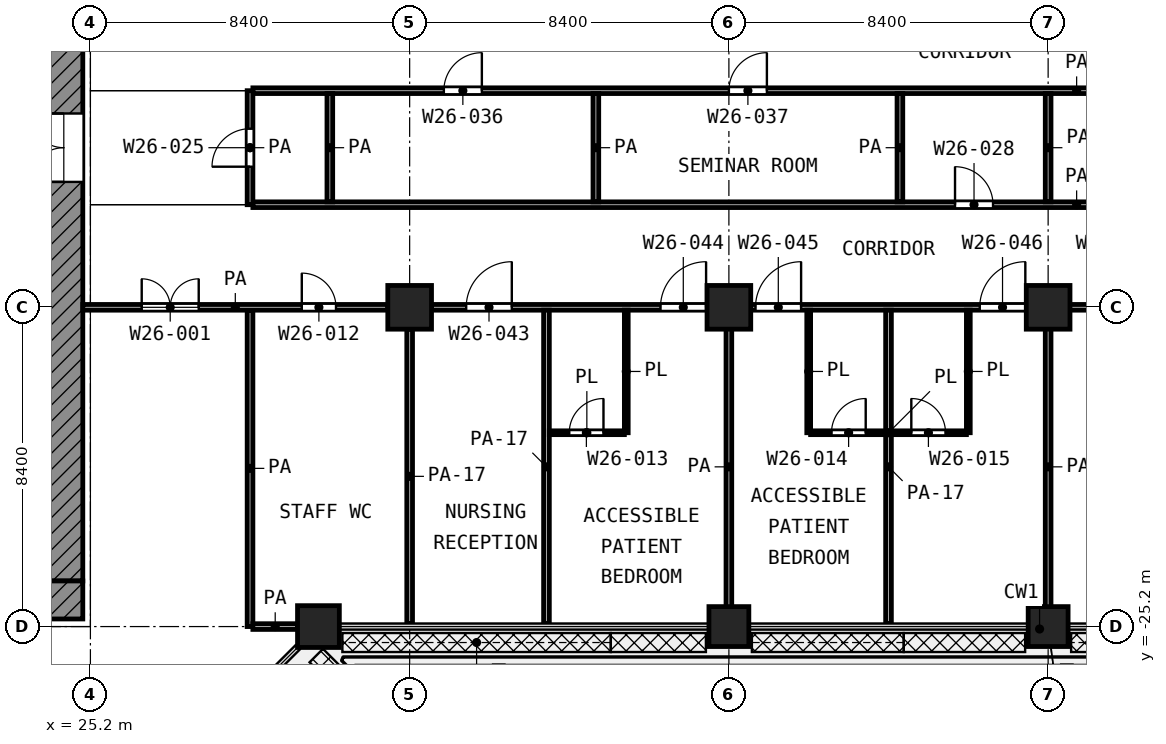
"""IFC4 building model, lengths in metres.
Left out: names, types, materials, properties, quantities, classifications, styles, units other than length and angle.
Written with IfcOpenShell. Run it as: python <this file> out.ifc"""

import sys

from ifc_helpers import new_model, si_unit, direction, frame, frame_2d, origin, origin_2d, place, context, subcontext, project, spatial, rectangle, extrude, element, fill, save


model = new_model("IFC4")
c1 = context("Model", 3, precision=1e-05, world=origin(), true_north=direction((0.0, 1.0)))
c2 = subcontext(c1, "Body", "Model", "MODEL_VIEW")
j1 = project(units=[si_unit("LENGTHUNIT", "METRE"), si_unit("PLANEANGLEUNIT", "RADIAN")], contexts=[c1])
p1 = place(None, origin())
s1 = spatial("IfcSite", under=j1, at=p1, CompositionType="ELEMENT")
p2 = place(p1, origin())
s2 = spatial("IfcBuilding", under=s1, at=p2, CompositionType="ELEMENT")
p3 = place(p2, frame((0.0, 0.0, 115.6)))
s3 = spatial("IfcBuildingStorey", under=s2, at=p3, CompositionType="ELEMENT", Elevation=115.6)
for number, where, z_axis, x_axis in (
    (1, (33.6, -16.8, 0.0), (0.0, 0.0, 1.0), (1.0, 0.0, 0.0)),
    (2, (42.0, -16.8, 0.0), (0.0, 0.0, 1.0), (1.0, 0.0, 0.0)),
    (3, (50.4, -16.8, 0.0), (0.0, 0.0, 1.0), (1.0, 0.0, 0.0)),
):
    element("IfcColumn", number, at=place(p3, frame(where, z_axis=z_axis, x_axis=x_axis)), inside=s3, PredefinedType="COLUMN", context=c2, shape_type="SweptSolid", body=[
        extrude(rectangle(XDim=1.15, YDim=1.15, at=origin_2d()), origin(), (0.0, 0.0, 1.0), 4.2),
    ])
p4 = place(p3, frame((31.2, -25.2, 0.0), z_axis=(0.0, 0.0, 1.0), x_axis=(1.0, 0.0, 0.0)))
e4 = element("IfcColumn", 4, at=p4, inside=s3, PredefinedType="COLUMN", context=c2, shape_type="SweptSolid", body=[
    extrude(rectangle(XDim=1.1, YDim=1.1, at=origin_2d()), origin(), (0.0, 0.0, 1.0), 4.2),
])
for number, where, z_axis, x_axis in (
    (5, (42.0, -25.2, 0.0), (0.0, 0.0, 1.0), (1.0, 0.0, 0.0)),
    (6, (50.4, -25.2, 0.0), (0.0, 0.0, 1.0), (1.0, 0.0, 0.0)),
):
    element("IfcColumn", number, at=place(p3, frame(where, z_axis=z_axis, x_axis=x_axis)), inside=s3, PredefinedType="COLUMN", context=c2, shape_type="SweptSolid", body=[
        extrude(rectangle(XDim=1.05, YDim=1.05, at=origin_2d()), origin(), (0.0, 0.0, 1.0), 4.2),
    ])
p5 = place(p3, frame((24.5, -24.0, 0.0), z_axis=(0.0, 0.0, 1.0), x_axis=(0.0, 1.0, 0.0)))
e7 = element("IfcWall", 7, at=p5, inside=s3, PredefinedType="SHEAR", context=c2, shape_type="SweptSolid", body=[
    extrude(rectangle(XDim=18.6, YDim=1.0, at=frame_2d((9.3, 0.0))), origin(), (0.0, 0.0, 1.0), 3.6),
])
p6 = place(p5, frame((10.5, 0.0, 0.0)))
e8 = element("IfcOpeningElement", 8, at=p6, cuts=e7, PredefinedType="OPENING", context=c2, shape_type="SweptSolid", body=[
    extrude(rectangle(XDim=1.8, YDim=2.1, at=frame_2d((0.9, 1.05))), frame((0.0, 0.51, 0.0), z_axis=(0.0, -1.0, 0.0), x_axis=(1.0, 0.0, 0.0)), (0.0, 0.0, 1.0), 1.02),
])
p7 = place(p3, frame((24.5, -25.0, 0.0), z_axis=(0.0, 0.0, 1.0), x_axis=(0.0, 1.0, 0.0)))
e9 = element("IfcWall", 9, at=p7, inside=s3, PredefinedType="SHEAR", context=c2, shape_type="SweptSolid", body=[
    extrude(rectangle(XDim=1.0, YDim=1.0, at=frame_2d((0.5, 0.0))), origin(), (0.0, 0.0, 1.0), 3.6),
])
p8 = place(p3, frame((37.275, -20.1, 0.0), z_axis=(0.0, 0.0, 1.0), x_axis=(1.0, 0.0, 0.0)))
e10 = element("IfcWall", 10, at=p8, inside=s3, PredefinedType="PARTITIONING", context=c2, shape_type="SweptSolid", body=[
    extrude(rectangle(XDim=1.975, YDim=0.1, at=frame_2d((0.988, 0.0))), origin(), (0.0, 0.0, 1.0), 3.6),
])
p9 = place(p8, frame((0.525, 0.0, 0.0)))
e11 = element("IfcOpeningElement", 11, at=p9, cuts=e10, PredefinedType="OPENING", context=c2, shape_type="SweptSolid", body=[
    extrude(rectangle(XDim=0.9, YDim=2.1, at=frame_2d((0.45, 1.05))), frame((0.0, 0.06, 0.0), z_axis=(0.0, -1.0, 0.0), x_axis=(1.0, 0.0, 0.0)), (0.0, 0.0, 1.0), 0.12),
])
p10 = place(p3, frame((44.15, -20.1, 0.0), z_axis=(0.0, 0.0, 1.0), x_axis=(1.0, 0.0, 0.0)))
e12 = element("IfcWall", 12, at=p10, inside=s3, PredefinedType="PARTITIONING", context=c2, shape_type="SweptSolid", body=[
    extrude(rectangle(XDim=4.1, YDim=0.1, at=frame_2d((2.05, 0.0))), origin(), (0.0, 0.0, 1.0), 3.6),
])
p11 = place(p10, frame((0.55, 0.0, 0.0)))
e13 = element("IfcOpeningElement", 13, at=p11, cuts=e12, PredefinedType="OPENING", context=c2, shape_type="SweptSolid", body=[
    extrude(rectangle(XDim=0.9, YDim=2.1, at=frame_2d((0.45, 1.05))), frame((0.0, 0.06, 0.0), z_axis=(0.0, -1.0, 0.0), x_axis=(1.0, 0.0, 0.0)), (0.0, 0.0, 1.0), 0.12),
])
p12 = place(p10, frame((2.65, 0.0, 0.0)))
e14 = element("IfcOpeningElement", 14, at=p12, cuts=e12, PredefinedType="OPENING", context=c2, shape_type="SweptSolid", body=[
    extrude(rectangle(XDim=0.9, YDim=2.1, at=frame_2d((0.45, 1.05))), frame((0.0, 0.06, 0.0), z_axis=(0.0, -1.0, 0.0), x_axis=(1.0, 0.0, 0.0)), (0.0, 0.0, 1.0), 0.12),
])
for number, where, z_axis, x_axis in (
    (15, (39.3, -20.1, 0.0), (0.0, 0.0, 1.0), (0.0, 1.0, 0.0)),
    (16, (44.1, -20.1, 0.0), (0.0, 0.0, 1.0), (0.0, 1.0, 0.0)),
    (17, (48.3, -20.1, 0.0), (0.0, 0.0, 1.0), (0.0, 1.0, 0.0)),
):
    element("IfcWall", number, at=place(p3, frame(where, z_axis=z_axis, x_axis=x_axis)), inside=s3, PredefinedType="PARTITIONING", context=c2, shape_type="SweptSolid", body=[
        extrude(rectangle(XDim=3.225, YDim=0.1, at=frame_2d((1.613, 0.0))), origin(), (0.0, 0.0, 1.0), 3.6),
    ])
p13 = place(p3, frame((29.475, -25.2, 0.0), z_axis=(0.0, 0.0, 1.0), x_axis=(1.0, 0.0, 0.0)))
e18 = element("IfcWall", 18, at=p13, inside=s3, PredefinedType="PARTITIONING", context=c2, shape_type="SweptSolid", body=[
    extrude(rectangle(XDim=1.175, YDim=0.15, at=frame_2d((0.587, 0.0))), origin(), (0.0, 0.0, 1.0), 3.6),
])
p14 = place(p3, frame((25.0, -16.8, 0.0), z_axis=(0.0, 0.0, 1.0), x_axis=(1.0, 0.0, 0.0)))
e19 = element("IfcWall", 19, at=p14, inside=s3, PredefinedType="PARTITIONING", context=c2, shape_type="SweptSolid", body=[
    extrude(rectangle(XDim=8.025, YDim=0.15, at=frame_2d((4.012, 0.0))), origin(), (0.0, 0.0, 1.0), 3.6),
])
p15 = place(p14, frame((1.55, 0.0, 0.0)))
e20 = element("IfcOpeningElement", 20, at=p15, cuts=e19, PredefinedType="OPENING", context=c2, shape_type="SweptSolid", body=[
    extrude(rectangle(XDim=1.5, YDim=2.1, at=frame_2d((0.75, 1.05))), frame((0.0, 0.085, 0.0), z_axis=(0.0, -1.0, 0.0), x_axis=(1.0, 0.0, 0.0)), (0.0, 0.0, 1.0), 0.17),
])
p16 = place(p14, frame((5.762, 0.0, 0.0)))
e21 = element("IfcOpeningElement", 21, at=p16, cuts=e19, PredefinedType="OPENING", context=c2, shape_type="SweptSolid", body=[
    extrude(rectangle(XDim=0.9, YDim=2.1, at=frame_2d((0.45, 1.05))), frame((0.0, 0.085, 0.0), z_axis=(0.0, -1.0, 0.0), x_axis=(1.0, 0.0, 0.0)), (0.0, 0.0, 1.0), 0.17),
])
p17 = place(p3, frame((34.175, -16.8, 0.0), z_axis=(0.0, 0.0, 1.0), x_axis=(1.0, 0.0, 0.0)))
e22 = element("IfcWall", 22, at=p17, inside=s3, PredefinedType="PARTITIONING", context=c2, shape_type="SweptSolid", body=[
    extrude(rectangle(XDim=41.345, YDim=0.15, at=frame_2d((20.672, 0.0))), origin(), (0.0, 0.0, 1.0), 3.6),
])
p18 = place(p17, frame((0.913, 0.0, 0.0)))
e23 = element("IfcOpeningElement", 23, at=p18, cuts=e22, PredefinedType="OPENING", context=c2, shape_type="SweptSolid", body=[
    extrude(rectangle(XDim=1.2, YDim=2.1, at=frame_2d((0.6, 1.05))), frame((0.0, 0.085, 0.0), z_axis=(0.0, -1.0, 0.0), x_axis=(1.0, 0.0, 0.0)), (0.0, 0.0, 1.0), 0.17),
])
p19 = place(p17, frame((6.025, 0.0, 0.0)))
e24 = element("IfcOpeningElement", 24, at=p19, cuts=e22, PredefinedType="OPENING", context=c2, shape_type="SweptSolid", body=[
    extrude(rectangle(XDim=1.2, YDim=2.1, at=frame_2d((0.6, 1.05))), frame((0.0, 0.085, 0.0), z_axis=(0.0, -1.0, 0.0), x_axis=(1.0, 0.0, 0.0)), (0.0, 0.0, 1.0), 0.17),
])
p20 = place(p17, frame((8.525, 0.0, 0.0)))
e25 = element("IfcOpeningElement", 25, at=p20, cuts=e22, PredefinedType="OPENING", context=c2, shape_type="SweptSolid", body=[
    extrude(rectangle(XDim=1.2, YDim=2.1, at=frame_2d((0.6, 1.05))), frame((0.0, 0.085, 0.0), z_axis=(0.0, -1.0, 0.0), x_axis=(1.0, 0.0, 0.0)), (0.0, 0.0, 1.0), 0.17),
])
p21 = place(p17, frame((14.425, 0.0, 0.0)))
e26 = element("IfcOpeningElement", 26, at=p21, cuts=e22, PredefinedType="OPENING", context=c2, shape_type="SweptSolid", body=[
    extrude(rectangle(XDim=1.2, YDim=2.1, at=frame_2d((0.6, 1.05))), frame((0.0, 0.085, 0.0), z_axis=(0.0, -1.0, 0.0), x_axis=(1.0, 0.0, 0.0)), (0.0, 0.0, 1.0), 0.17),
])
p22 = place(p17, frame((17.425, 0.0, 0.0)))
e27 = element("IfcOpeningElement", 27, at=p22, cuts=e22, PredefinedType="OPENING", context=c2, shape_type="SweptSolid", body=[
    extrude(rectangle(XDim=1.2, YDim=2.1, at=frame_2d((0.6, 1.05))), frame((0.0, 0.085, 0.0), z_axis=(0.0, -1.0, 0.0), x_axis=(1.0, 0.0, 0.0)), (0.0, 0.0, 1.0), 0.17),
])
p23 = place(p17, frame((22.825, 0.0, 0.0)))
e28 = element("IfcOpeningElement", 28, at=p23, cuts=e22, PredefinedType="OPENING", context=c2, shape_type="SweptSolid", body=[
    extrude(rectangle(XDim=1.2, YDim=2.1, at=frame_2d((0.6, 1.05))), frame((0.0, 0.085, 0.0), z_axis=(0.0, -1.0, 0.0), x_axis=(1.0, 0.0, 0.0)), (0.0, 0.0, 1.0), 0.17),
])
p24 = place(p17, frame((21.225, 0.0, 0.0)))
e29 = element("IfcOpeningElement", 29, at=p24, cuts=e22, PredefinedType="OPENING", context=c2, shape_type="SweptSolid", body=[
    extrude(rectangle(XDim=1.2, YDim=2.1, at=frame_2d((0.6, 1.05))), frame((0.0, 0.085, 0.0), z_axis=(0.0, -1.0, 0.0), x_axis=(1.0, 0.0, 0.0)), (0.0, 0.0, 1.0), 0.17),
])
p25 = place(p17, frame((31.225, 0.0, 0.0)))
e30 = element("IfcOpeningElement", 30, at=p25, cuts=e22, PredefinedType="OPENING", context=c2, shape_type="SweptSolid", body=[
    extrude(rectangle(XDim=1.2, YDim=2.1, at=frame_2d((0.6, 1.05))), frame((0.0, 0.085, 0.0), z_axis=(0.0, -1.0, 0.0), x_axis=(1.0, 0.0, 0.0)), (0.0, 0.0, 1.0), 0.17),
])
p26 = place(p17, frame((34.025, 0.0, 0.0)))
e31 = element("IfcOpeningElement", 31, at=p26, cuts=e22, PredefinedType="OPENING", context=c2, shape_type="SweptSolid", body=[
    extrude(rectangle(XDim=1.2, YDim=2.1, at=frame_2d((0.6, 1.05))), frame((0.0, 0.085, 0.0), z_axis=(0.0, -1.0, 0.0), x_axis=(1.0, 0.0, 0.0)), (0.0, 0.0, 1.0), 0.17),
])
p27 = place(p17, frame((38.975, 0.0, 0.0)))
e32 = element("IfcOpeningElement", 32, at=p27, cuts=e22, PredefinedType="OPENING", context=c2, shape_type="SweptSolid", body=[
    extrude(rectangle(XDim=1.0, YDim=2.1, at=frame_2d((0.5, 1.05))), frame((0.0, 0.085, 0.0), z_axis=(0.0, -1.0, 0.0), x_axis=(1.0, 0.0, 0.0)), (0.0, 0.0, 1.0), 0.17),
])
p28 = place(p3, frame((29.475, -14.1, 0.0), z_axis=(0.0, 0.0, 1.0), x_axis=(1.0, 0.0, 0.0)))
e33 = element("IfcWall", 33, at=p28, inside=s3, PredefinedType="PARTITIONING", context=c2, shape_type="SweptSolid", body=[
    extrude(rectangle(XDim=43.35, YDim=0.15, at=frame_2d((21.675, 0.0))), origin(), (0.0, 0.0, 1.0), 3.6),
])
p29 = place(p28, frame((18.475, 0.0, 0.0)))
e34 = element("IfcOpeningElement", 34, at=p29, cuts=e33, PredefinedType="OPENING", context=c2, shape_type="SweptSolid", body=[
    extrude(rectangle(XDim=1.0, YDim=2.1, at=frame_2d((0.5, 1.05))), frame((0.0, 0.085, 0.0), z_axis=(0.0, -1.0, 0.0), x_axis=(1.0, 0.0, 0.0)), (0.0, 0.0, 1.0), 0.17),
])
p30 = place(p3, frame((29.475, -11.1, 0.0), z_axis=(0.0, 0.0, 1.0), x_axis=(1.0, 0.0, 0.0)))
e35 = element("IfcWall", 35, at=p30, inside=s3, PredefinedType="PARTITIONING", context=c2, shape_type="SweptSolid", body=[
    extrude(rectangle(XDim=43.35, YDim=0.15, at=frame_2d((21.675, 0.0))), origin(), (0.0, 0.0, 1.0), 3.6),
])
p31 = place(p30, frame((28.825, 0.0, 0.0)))
e36 = element("IfcOpeningElement", 36, at=p31, cuts=e35, PredefinedType="OPENING", context=c2, shape_type="SweptSolid", body=[
    extrude(rectangle(XDim=1.0, YDim=2.1, at=frame_2d((0.5, 1.05))), frame((0.0, 0.085, 0.0), z_axis=(0.0, -1.0, 0.0), x_axis=(1.0, 0.0, 0.0)), (0.0, 0.0, 1.0), 0.17),
])
p32 = place(p30, frame((40.125, 0.0, 0.0)))
e37 = element("IfcOpeningElement", 37, at=p32, cuts=e35, PredefinedType="OPENING", context=c2, shape_type="SweptSolid", body=[
    extrude(rectangle(XDim=0.9, YDim=2.1, at=frame_2d((0.45, 1.05))), frame((0.0, 0.085, 0.0), z_axis=(0.0, -1.0, 0.0), x_axis=(1.0, 0.0, 0.0)), (0.0, 0.0, 1.0), 0.17),
])
p33 = place(p30, frame((5.025, 0.0, 0.0)))
e38 = element("IfcOpeningElement", 38, at=p33, cuts=e35, PredefinedType="OPENING", context=c2, shape_type="SweptSolid", body=[
    extrude(rectangle(XDim=1.0, YDim=2.1, at=frame_2d((0.5, 1.05))), frame((0.0, 0.085, 0.0), z_axis=(0.0, -1.0, 0.0), x_axis=(1.0, 0.0, 0.0)), (0.0, 0.0, 1.0), 0.17),
])
p34 = place(p30, frame((12.525, 0.0, 0.0)))
e39 = element("IfcOpeningElement", 39, at=p34, cuts=e35, PredefinedType="OPENING", context=c2, shape_type="SweptSolid", body=[
    extrude(rectangle(XDim=1.0, YDim=2.1, at=frame_2d((0.5, 1.05))), frame((0.0, 0.085, 0.0), z_axis=(0.0, -1.0, 0.0), x_axis=(1.0, 0.0, 0.0)), (0.0, 0.0, 1.0), 0.17),
])
p35 = place(p3, frame((29.4, -25.2, 0.0), z_axis=(0.0, 0.0, 1.0), x_axis=(0.0, 1.0, 0.0)))
e40 = element("IfcWall", 40, at=p35, inside=s3, PredefinedType="PARTITIONING", context=c2, shape_type="SweptSolid", body=[
    extrude(rectangle(XDim=8.325, YDim=0.15, at=frame_2d((4.163, 0.0))), origin(), (0.0, 0.0, 1.0), 3.6),
])
p36 = place(p3, frame((29.4, -14.1, 0.0), z_axis=(0.0, 0.0, 1.0), x_axis=(0.0, 1.0, 0.0)))
e41 = element("IfcWall", 41, at=p36, inside=s3, PredefinedType="PARTITIONING", context=c2, shape_type="SweptSolid", body=[
    extrude(rectangle(XDim=3.0, YDim=0.15, at=frame_2d((1.5, 0.0))), origin(), (0.0, 0.0, 1.0), 3.6),
])
p37 = place(p36, frame((1.0, 0.0, 0.0)))
e42 = element("IfcOpeningElement", 42, at=p37, cuts=e41, PredefinedType="OPENING", context=c2, shape_type="SweptSolid", body=[
    extrude(rectangle(XDim=1.0, YDim=2.1, at=frame_2d((0.5, 1.05))), frame((0.0, 0.085, 0.0), z_axis=(0.0, -1.0, 0.0), x_axis=(1.0, 0.0, 0.0)), (0.0, 0.0, 1.0), 0.17),
])
p38 = place(p3, frame((31.5, -14.025, 0.0), z_axis=(0.0, 0.0, 1.0), x_axis=(0.0, 1.0, 0.0)))
e43 = element("IfcWall", 43, at=p38, inside=s3, PredefinedType="PARTITIONING", context=c2, shape_type="SweptSolid", body=[
    extrude(rectangle(XDim=2.85, YDim=0.15, at=frame_2d((1.425, 0.0))), origin(), (0.0, 0.0, 1.0), 3.6),
])
p39 = place(p3, frame((33.6, -25.12, 0.0), z_axis=(0.0, 0.0, 1.0), x_axis=(0.0, 1.0, 0.0)))
e44 = element("IfcWall", 44, at=p39, inside=s3, PredefinedType="PARTITIONING", context=c2, shape_type="SweptSolid", body=[
    extrude(rectangle(XDim=7.745, YDim=0.15, at=frame_2d((3.873, 0.0))), origin(), (0.0, 0.0, 1.0), 2.7),
])
p40 = place(p3, frame((37.2, -25.12, 0.0), z_axis=(0.0, 0.0, 1.0), x_axis=(0.0, 1.0, 0.0)))
e45 = element("IfcWall", 45, at=p40, inside=s3, PredefinedType="PARTITIONING", context=c2, shape_type="SweptSolid", body=[
    extrude(rectangle(XDim=8.245, YDim=0.15, at=frame_2d((4.123, 0.0))), origin(), (0.0, 0.0, 1.0), 2.7),
])
p41 = place(p3, frame((38.5, -14.025, 0.0), z_axis=(0.0, 0.0, 1.0), x_axis=(0.0, 1.0, 0.0)))
e46 = element("IfcWall", 46, at=p41, inside=s3, PredefinedType="PARTITIONING", context=c2, shape_type="SweptSolid", body=[
    extrude(rectangle(XDim=2.85, YDim=0.15, at=frame_2d((1.425, 0.0))), origin(), (0.0, 0.0, 1.0), 3.6),
])
p42 = place(p3, frame((42.0, -25.12, 0.0), z_axis=(0.0, 0.0, 1.0), x_axis=(0.0, 1.0, 0.0)))
e47 = element("IfcWall", 47, at=p42, inside=s3, PredefinedType="PARTITIONING", context=c2, shape_type="SweptSolid", body=[
    extrude(rectangle(XDim=8.245, YDim=0.15, at=frame_2d((4.123, 0.0))), origin(), (0.0, 0.0, 1.0), 3.6),
])
p43 = place(p3, frame((46.2, -25.12, 0.0), z_axis=(0.0, 0.0, 1.0), x_axis=(0.0, 1.0, 0.0)))
e48 = element("IfcWall", 48, at=p43, inside=s3, PredefinedType="PARTITIONING", context=c2, shape_type="SweptSolid", body=[
    extrude(rectangle(XDim=8.245, YDim=0.15, at=frame_2d((4.123, 0.0))), origin(), (0.0, 0.0, 1.0), 2.7),
])
p44 = place(p3, frame((46.5, -14.025, 0.0), z_axis=(0.0, 0.0, 1.0), x_axis=(0.0, 1.0, 0.0)))
e49 = element("IfcWall", 49, at=p44, inside=s3, PredefinedType="PARTITIONING", context=c2, shape_type="SweptSolid", body=[
    extrude(rectangle(XDim=2.85, YDim=0.15, at=frame_2d((1.425, 0.0))), origin(), (0.0, 0.0, 1.0), 3.6),
])
p45 = place(p3, frame((50.4, -25.12, 0.0), z_axis=(0.0, 0.0, 1.0), x_axis=(0.0, 1.0, 0.0)))
e50 = element("IfcWall", 50, at=p45, inside=s3, PredefinedType="PARTITIONING", context=c2, shape_type="SweptSolid", body=[
    extrude(rectangle(XDim=8.245, YDim=0.15, at=frame_2d((4.123, 0.0))), origin(), (0.0, 0.0, 1.0), 3.6),
])
p46 = place(p3, frame((50.4, -14.025, 0.0), z_axis=(0.0, 0.0, 1.0), x_axis=(0.0, 1.0, 0.0)))
e51 = element("IfcWall", 51, at=p46, inside=s3, PredefinedType="PARTITIONING", context=c2, shape_type="SweptSolid", body=[
    extrude(rectangle(XDim=2.85, YDim=0.15, at=frame_2d((1.425, 0.0))), origin(), (0.0, 0.0, 1.0), 3.6),
])
p47 = place(p6, origin())
e52 = element("IfcDoor", 52, at=p47, inside=s3, OperationType="DOUBLE_DOOR_SINGLE_SWING", PredefinedType="DOOR", context=c2, shape_type="SweptSolid", body=[
    extrude(rectangle(XDim=1.8, YDim=2.1, at=frame_2d((0.9, 1.05))), frame((0.0, 0.025, 0.0), z_axis=(0.0, -1.0, 0.0), x_axis=(1.0, 0.0, 0.0)), (0.0, 0.0, 1.0), 0.05),
])
fill(e8, e52)
p48 = place(p15, origin())
e53 = element("IfcDoor", 53, at=p48, inside=s3, OperationType="DOUBLE_DOOR_SINGLE_SWING", PredefinedType="DOOR", context=c2, shape_type="SweptSolid", body=[
    extrude(rectangle(XDim=1.5, YDim=2.1, at=frame_2d((0.75, 1.05))), frame((0.0, 0.025, 0.0), z_axis=(0.0, -1.0, 0.0), x_axis=(1.0, 0.0, 0.0)), (0.0, 0.0, 1.0), 0.05),
])
fill(e20, e53)
p49 = place(p29, origin())
e54 = element("IfcDoor", 54, at=p49, inside=s3, OperationType="SINGLE_SWING_LEFT", PredefinedType="DOOR", context=c2, shape_type="SweptSolid", body=[
    extrude(rectangle(XDim=1.0, YDim=2.1, at=frame_2d((0.5, 1.05))), frame((0.0, 0.025, 0.0), z_axis=(0.0, -1.0, 0.0), x_axis=(1.0, 0.0, 0.0)), (0.0, 0.0, 1.0), 0.05),
])
fill(e34, e54)
p50 = place(p16, origin())
e55 = element("IfcDoor", 55, at=p50, inside=s3, OperationType="SINGLE_SWING_LEFT", PredefinedType="DOOR", context=c2, shape_type="SweptSolid", body=[
    extrude(rectangle(XDim=0.9, YDim=2.1, at=frame_2d((0.45, 1.05))), frame((0.0, 0.025, 0.0), z_axis=(0.0, -1.0, 0.0), x_axis=(1.0, 0.0, 0.0)), (0.0, 0.0, 1.0), 0.05),
])
fill(e21, e55)
p51 = place(p18, origin())
e56 = element("IfcDoor", 56, at=p51, inside=s3, OperationType="SINGLE_SWING_RIGHT", PredefinedType="DOOR", context=c2, shape_type="SweptSolid", body=[
    extrude(rectangle(XDim=1.2, YDim=2.1, at=frame_2d((0.6, 1.05))), frame((0.0, 0.025, 0.0), z_axis=(0.0, -1.0, 0.0), x_axis=(1.0, 0.0, 0.0)), (0.0, 0.0, 1.0), 0.05),
])
fill(e23, e56)
p52 = place(p19, origin())
e57 = element("IfcDoor", 57, at=p52, inside=s3, OperationType="SINGLE_SWING_RIGHT", PredefinedType="DOOR", context=c2, shape_type="SweptSolid", body=[
    extrude(rectangle(XDim=1.2, YDim=2.1, at=frame_2d((0.6, 1.05))), frame((0.0, 0.025, 0.0), z_axis=(0.0, -1.0, 0.0), x_axis=(1.0, 0.0, 0.0)), (0.0, 0.0, 1.0), 0.05),
])
fill(e24, e57)
p53 = place(p9, origin())
e58 = element("IfcDoor", 58, at=p53, inside=s3, OperationType="SINGLE_SWING_RIGHT", PredefinedType="DOOR", context=c2, shape_type="SweptSolid", body=[
    extrude(rectangle(XDim=0.9, YDim=2.1, at=frame_2d((0.45, 1.05))), frame((0.0, 0.025, 0.0), z_axis=(0.0, -1.0, 0.0), x_axis=(1.0, 0.0, 0.0)), (0.0, 0.0, 1.0), 0.05),
])
fill(e11, e58)
p54 = place(p20, origin())
e59 = element("IfcDoor", 59, at=p54, inside=s3, OperationType="SINGLE_SWING_RIGHT", PredefinedType="DOOR", context=c2, shape_type="SweptSolid", body=[
    extrude(rectangle(XDim=1.2, YDim=2.1, at=frame_2d((0.6, 1.05))), frame((0.0, 0.025, 0.0), z_axis=(0.0, -1.0, 0.0), x_axis=(1.0, 0.0, 0.0)), (0.0, 0.0, 1.0), 0.05),
])
fill(e25, e59)
p55 = place(p11, origin())
e60 = element("IfcDoor", 60, at=p55, inside=s3, OperationType="SINGLE_SWING_RIGHT", PredefinedType="DOOR", context=c2, shape_type="SweptSolid", body=[
    extrude(rectangle(XDim=0.9, YDim=2.1, at=frame_2d((0.45, 1.05))), frame((0.0, 0.025, 0.0), z_axis=(0.0, -1.0, 0.0), x_axis=(1.0, 0.0, 0.0)), (0.0, 0.0, 1.0), 0.05),
])
fill(e13, e60)
p56 = place(p21, origin())
e61 = element("IfcDoor", 61, at=p56, inside=s3, OperationType="SINGLE_SWING_RIGHT", PredefinedType="DOOR", context=c2, shape_type="SweptSolid", body=[
    extrude(rectangle(XDim=1.2, YDim=2.1, at=frame_2d((0.6, 1.05))), frame((0.0, 0.025, 0.0), z_axis=(0.0, -1.0, 0.0), x_axis=(1.0, 0.0, 0.0)), (0.0, 0.0, 1.0), 0.05),
])
fill(e26, e61)
p57 = place(p12, origin())
e62 = element("IfcDoor", 62, at=p57, inside=s3, OperationType="SINGLE_SWING_LEFT", PredefinedType="DOOR", context=c2, shape_type="SweptSolid", body=[
    extrude(rectangle(XDim=0.9, YDim=2.1, at=frame_2d((0.45, 1.05))), frame((0.0, 0.025, 0.0), z_axis=(0.0, -1.0, 0.0), x_axis=(1.0, 0.0, 0.0)), (0.0, 0.0, 1.0), 0.05),
])
fill(e14, e62)
p58 = place(p37, origin())
e63 = element("IfcDoor", 63, at=p58, inside=s3, OperationType="SINGLE_SWING_LEFT", PredefinedType="DOOR", context=c2, shape_type="SweptSolid", body=[
    extrude(rectangle(XDim=1.0, YDim=2.1, at=frame_2d((0.5, 1.05))), frame((0.0, 0.025, 0.0), z_axis=(0.0, -1.0, 0.0), x_axis=(1.0, 0.0, 0.0)), (0.0, 0.0, 1.0), 0.05),
])
fill(e42, e63)
p59 = place(p33, origin())
e64 = element("IfcDoor", 64, at=p59, inside=s3, OperationType="SINGLE_SWING_RIGHT", PredefinedType="DOOR", context=c2, shape_type="SweptSolid", body=[
    extrude(rectangle(XDim=1.0, YDim=2.1, at=frame_2d((0.5, 1.05))), frame((0.0, 0.025, 0.0), z_axis=(0.0, -1.0, 0.0), x_axis=(1.0, 0.0, 0.0)), (0.0, 0.0, 1.0), 0.05),
])
fill(e38, e64)
p60 = place(p34, origin())
e65 = element("IfcDoor", 65, at=p60, inside=s3, OperationType="SINGLE_SWING_RIGHT", PredefinedType="DOOR", context=c2, shape_type="SweptSolid", body=[
    extrude(rectangle(XDim=1.0, YDim=2.1, at=frame_2d((0.5, 1.05))), frame((0.0, 0.025, 0.0), z_axis=(0.0, -1.0, 0.0), x_axis=(1.0, 0.0, 0.0)), (0.0, 0.0, 1.0), 0.05),
])
fill(e39, e65)
save(model, sys.argv[1])
